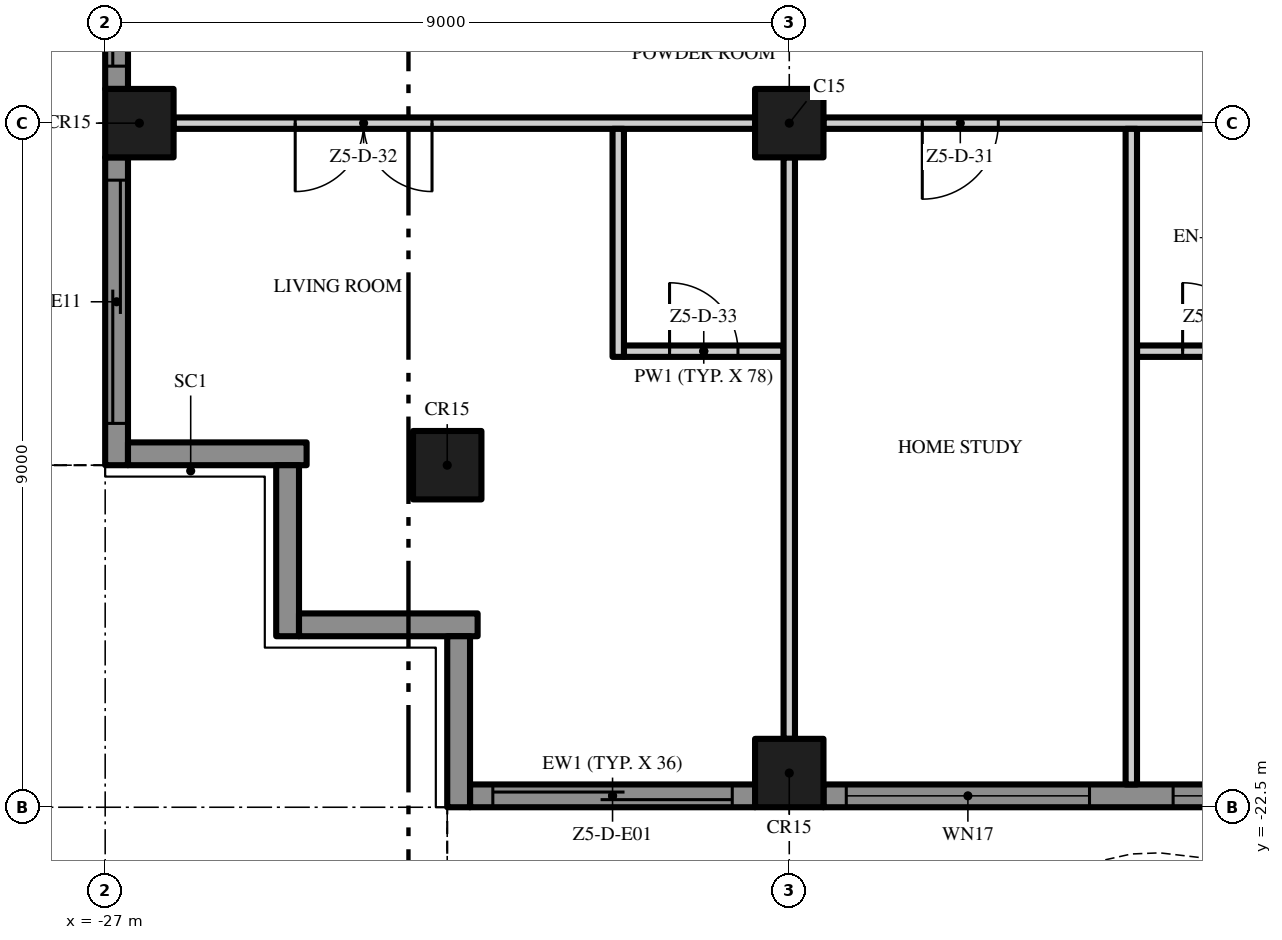
"""IFC4 building model, lengths in metres.
Left out: names, types, materials, properties, quantities, classifications, styles, units other than length and angle.
Written with IfcOpenShell. Run it as: python <this file> out.ifc"""

import sys

from ifc_helpers import new_model, si_unit, direction, frame, frame_2d, origin, origin_2d, place, context, subcontext, project, spatial, polyline, rectangle, outline, extrude, element, fill, save


model = new_model("IFC4")
c1 = context("Model", 3, precision=1e-05, world=origin(), true_north=direction((0.0, 1.0)))
c2 = subcontext(c1, "Body", "Model", "MODEL_VIEW")
j1 = project(units=[si_unit("LENGTHUNIT", "METRE"), si_unit("PLANEANGLEUNIT", "RADIAN")], contexts=[c1])
p1 = place(None, origin())
s1 = spatial("IfcSite", under=j1, at=p1, CompositionType="ELEMENT")
p2 = place(p1, origin())
s2 = spatial("IfcBuilding", under=s1, at=p2, CompositionType="ELEMENT")
p3 = place(p2, frame((0.0, 0.0, 276.8)))
s3 = spatial("IfcBuildingStorey", under=s2, at=p3, CompositionType="ELEMENT", Elevation=276.8)
for number, where, z_axis, x_axis in (
    (1, (-18.0, -13.5, 0.0), (0.0, 0.0, 1.0), (1.0, 0.0, 0.0)),
    (2, (-18.0, -22.05, 0.0), (0.0, 0.0, 1.0), (1.0, 0.0, 0.0)),
    (3, (-26.55, -13.5, 0.0), (0.0, 0.0, 1.0), (1.0, 0.0, 0.0)),
    (4, (-22.5, -18.0, 0.0), (0.0, 0.0, 1.0), (1.0, 0.0, 0.0)),
):
    element("IfcColumn", number, at=place(p3, frame(where, z_axis=z_axis, x_axis=x_axis)), inside=s3, PredefinedType="COLUMN", context=c2, shape_type="SweptSolid", body=[
        extrude(rectangle(XDim=0.9, YDim=0.9, at=origin_2d()), origin(), (0.0, 0.0, 1.0), 3.5),
    ])
p4 = place(p3, frame((-18.45, -22.35, 0.0), z_axis=(0.0, 0.0, 1.0), x_axis=(-1.0, 0.0, 0.0)))
e5 = element("IfcWall", 5, at=p4, inside=s3, PredefinedType="SOLIDWALL", context=c2, shape_type="SweptSolid", body=[
    extrude(rectangle(XDim=3.75, YDim=0.3, at=frame_2d((1.875, 0.0))), origin(), (0.0, 0.0, 1.0), 3.5),
])
p5 = place(p4, frame((0.3, 0.0, 0.0)))
e6 = element("IfcOpeningElement", 6, at=p5, cuts=e5, PredefinedType="OPENING", context=c2, shape_type="SweptSolid", body=[
    extrude(rectangle(XDim=3.15, YDim=2.4, at=frame_2d((1.575, 1.2))), frame((0.0, 0.16, 0.0), z_axis=(0.0, -1.0, 0.0), x_axis=(1.0, 0.0, 0.0)), (0.0, 0.0, 1.0), 0.32),
])
p6 = place(p3, frame((-9.45, -22.35, 0.0), z_axis=(0.0, 0.0, 1.0), x_axis=(-1.0, 0.0, 0.0)))
e7 = element("IfcWall", 7, at=p6, inside=s3, PredefinedType="SOLIDWALL", context=c2, shape_type="SweptSolid", body=[
    extrude(rectangle(XDim=8.1, YDim=0.3, at=frame_2d((4.05, 0.0))), origin(), (0.0, 0.0, 1.0), 3.5),
])
p7 = place(p6, frame((4.6, 0.0, 0.45)))
e8 = element("IfcOpeningElement", 8, at=p7, cuts=e7, PredefinedType="OPENING", context=c2, shape_type="SweptSolid", body=[
    extrude(rectangle(XDim=3.2, YDim=2.65, at=frame_2d((1.6, 1.325))), frame((0.0, 0.16, 0.0), z_axis=(0.0, -1.0, 0.0), x_axis=(1.0, 0.0, 0.0)), (0.0, 0.0, 1.0), 0.32),
])
p8 = place(p6, frame((0.3, 0.0, 0.45)))
e9 = element("IfcOpeningElement", 9, at=p8, cuts=e7, PredefinedType="OPENING", context=c2, shape_type="SweptSolid", body=[
    extrude(rectangle(XDim=3.2, YDim=2.65, at=frame_2d((1.6, 1.325))), frame((0.0, 0.16, 0.0), z_axis=(0.0, -1.0, 0.0), x_axis=(1.0, 0.0, 0.0)), (0.0, 0.0, 1.0), 0.32),
])
p9 = place(p3, frame((-26.85, -13.05, 0.0), z_axis=(0.0, 0.0, 1.0), x_axis=(0.0, 1.0, 0.0)))
e10 = element("IfcWall", 10, at=p9, inside=s3, PredefinedType="SOLIDWALL", context=c2, shape_type="SweptSolid", body=[
    extrude(rectangle(XDim=8.1, YDim=0.3, at=frame_2d((4.05, 0.0))), origin(), (0.0, 0.0, 1.0), 3.5),
])
p10 = place(p9, frame((4.6, 0.0, 0.45)))
e11 = element("IfcOpeningElement", 11, at=p10, cuts=e10, PredefinedType="OPENING", context=c2, shape_type="SweptSolid", body=[
    extrude(rectangle(XDim=3.2, YDim=2.65, at=frame_2d((1.6, 1.325))), frame((0.0, 0.16, 0.0), z_axis=(0.0, -1.0, 0.0), x_axis=(1.0, 0.0, 0.0)), (0.0, 0.0, 1.0), 0.32),
])
p11 = place(p9, frame((0.3, 0.0, 0.0)))
e12 = element("IfcOpeningElement", 12, at=p11, cuts=e10, PredefinedType="OPENING", context=c2, shape_type="SweptSolid", body=[
    extrude(rectangle(XDim=3.2, YDim=2.4, at=frame_2d((1.6, 1.2))), frame((0.0, 0.16, 0.0), z_axis=(0.0, -1.0, 0.0), x_axis=(1.0, 0.0, 0.0)), (0.0, 0.0, 1.0), 0.32),
])
p12 = place(p3, frame((-26.85, -18.0, 0.0), z_axis=(0.0, 0.0, 1.0), x_axis=(0.0, 1.0, 0.0)))
e13 = element("IfcWall", 13, at=p12, inside=s3, PredefinedType="SOLIDWALL", context=c2, shape_type="SweptSolid", body=[
    extrude(rectangle(XDim=4.05, YDim=0.3, at=frame_2d((2.025, 0.0))), origin(), (0.0, 0.0, 1.0), 3.5),
])
p13 = place(p12, frame((0.55, 0.0, 0.0)))
e14 = element("IfcOpeningElement", 14, at=p13, cuts=e13, PredefinedType="OPENING", context=c2, shape_type="SweptSolid", body=[
    extrude(rectangle(XDim=3.2, YDim=2.4, at=frame_2d((1.6, 1.2))), frame((0.0, 0.16, 0.0), z_axis=(0.0, -1.0, 0.0), x_axis=(1.0, 0.0, 0.0)), (0.0, 0.0, 1.0), 0.32),
])
p14 = place(p3, frame((-24.35, -17.85, 0.0), z_axis=(0.0, 0.0, 1.0), x_axis=(-1.0, 0.0, 0.0)))
e15 = element("IfcWall", 15, at=p14, inside=s3, PredefinedType="SOLIDWALL", context=c2, shape_type="SweptSolid", body=[
    extrude(rectangle(XDim=2.35, YDim=0.3, at=frame_2d((1.175, 0.0))), origin(), (0.0, 0.0, 1.0), 3.5),
])
p15 = place(p3, frame((-24.6, -20.25, 0.0), z_axis=(0.0, 0.0, 1.0), x_axis=(0.0, 1.0, 0.0)))
e16 = element("IfcWall", 16, at=p15, inside=s3, PredefinedType="SOLIDWALL", context=c2, shape_type="SweptSolid", body=[
    extrude(rectangle(XDim=2.25, YDim=0.3, at=frame_2d((1.125, 0.0))), origin(), (0.0, 0.0, 1.0), 3.5),
])
p16 = place(p3, frame((-22.1, -20.1, 0.0), z_axis=(0.0, 0.0, 1.0), x_axis=(-1.0, 0.0, 0.0)))
e17 = element("IfcWall", 17, at=p16, inside=s3, PredefinedType="SOLIDWALL", context=c2, shape_type="SweptSolid", body=[
    extrude(rectangle(XDim=2.35, YDim=0.3, at=frame_2d((1.175, 0.0))), origin(), (0.0, 0.0, 1.0), 3.5),
])
p17 = place(p3, frame((-22.35, -22.5, 0.0), z_axis=(0.0, 0.0, 1.0), x_axis=(0.0, 1.0, 0.0)))
e18 = element("IfcWall", 18, at=p17, inside=s3, PredefinedType="SOLIDWALL", context=c2, shape_type="SweptSolid", body=[
    extrude(rectangle(XDim=2.25, YDim=0.3, at=frame_2d((1.125, 0.0))), origin(), (0.0, 0.0, 1.0), 3.5),
])
p18 = place(p3, origin())
e19 = element("IfcWall", 19, at=p18, inside=s3, PredefinedType="USERDEFINED", context=c2, shape_type="SweptSolid", body=[
    extrude(outline(polyline([(-22.5, -25.149), (-21.0, -25.485), (-20.625, -25.5), (-19.5, -25.369), (-18.0, -24.845), (-16.5, -24.112), (-15.0, -23.451), (-13.5, -23.115), (-13.125, -23.1), (-12.0, -23.231), (-10.5, -23.755), (-9.0, -24.488), (-7.5, -25.149), (-6.0, -25.485), (-5.625, -25.5), (-4.5, -25.369), (-3.0, -24.845), (-1.5, -24.112), (0.0, -23.451), (1.5, -23.115), (1.875, -23.1), (3.0, -23.231), (4.5, -23.755), (6.0, -24.488), (7.5, -25.149), (9.0, -25.485), (9.375, -25.5), (10.5, -25.369), (12.0, -24.845), (13.5, -24.112), (15.0, -23.451), (16.5, -23.115), (16.875, -23.1), (18.0, -23.231), (19.5, -23.755), (21.0, -24.488), (22.5, -25.149), (22.601, -24.92), (21.105, -24.261), (19.596, -23.524), (18.056, -22.986), (16.885, -22.849), (16.467, -22.866), (14.921, -23.213), (13.395, -23.885), (11.904, -24.614), (10.444, -25.124), (9.365, -25.249), (9.033, -25.236), (7.579, -24.91), (6.105, -24.261), (4.596, -23.524), (3.056, -22.986), (1.885, -22.849), (1.467, -22.866), (-0.079, -23.213), (-1.605, -23.885), (-3.096, -24.614), (-4.556, -25.124), (-5.635, -25.249), (-5.967, -25.236), (-7.421, -24.91), (-8.895, -24.261), (-10.404, -23.524), (-11.944, -22.986), (-13.115, -22.849), (-13.533, -22.866), (-15.079, -23.213), (-16.605, -23.885), (-18.096, -24.614), (-19.556, -25.124), (-20.635, -25.249), (-20.967, -25.236), (-22.445, -24.905), (-22.5, -25.149)])), origin(), (0.0, 0.0, 1.0), 0.9),
])
p19 = place(p3, origin())
e20 = element("IfcWall", 20, at=p19, inside=s3, PredefinedType="USERDEFINED", context=c2, shape_type="SweptSolid", body=[
    extrude(outline(polyline([(-29.649, 18.0), (-29.985, 16.5), (-30.0, 16.125), (-29.869, 15.0), (-29.345, 13.5), (-28.612, 12.0), (-27.951, 10.5), (-27.615, 9.0), (-27.6, 8.625), (-27.731, 7.5), (-28.255, 6.0), (-28.988, 4.5), (-29.649, 3.0), (-29.985, 1.5), (-30.0, 1.125), (-29.869, 0.0), (-29.345, -1.5), (-28.612, -3.0), (-27.951, -4.5), (-27.615, -6.0), (-27.6, -6.375), (-27.731, -7.5), (-28.255, -9.0), (-28.988, -10.5), (-29.649, -12.0), (-29.985, -13.5), (-30.0, -13.875), (-29.869, -15.0), (-29.345, -16.5), (-28.612, -18.0), (-28.388, -17.89), (-29.114, -16.404), (-29.624, -14.944), (-29.749, -13.865), (-29.736, -13.533), (-29.41, -12.079), (-28.761, -10.605), (-28.024, -9.096), (-27.486, -7.556), (-27.349, -6.385), (-27.366, -5.967), (-27.713, -4.421), (-28.385, -2.895), (-29.114, -1.404), (-29.624, 0.056), (-29.749, 1.135), (-29.736, 1.467), (-29.41, 2.921), (-28.761, 4.395), (-28.024, 5.904), (-27.486, 7.444), (-27.349, 8.615), (-27.366, 9.033), (-27.713, 10.579), (-28.385, 12.105), (-29.114, 13.596), (-29.624, 15.056), (-29.749, 16.135), (-29.736, 16.467), (-29.405, 17.945), (-29.649, 18.0)])), origin(), (0.0, 0.0, 1.0), 0.9),
])
p20 = place(p3, frame((-20.175, -16.5, 0.0), z_axis=(0.0, 0.0, 1.0), x_axis=(1.0, 0.0, 0.0)))
e21 = element("IfcWall", 21, at=p20, inside=s3, PredefinedType="PARTITIONING", context=c2, shape_type="SweptSolid", body=[
    extrude(rectangle(XDim=2.1, YDim=0.15, at=frame_2d((1.05, 0.0))), origin(), (0.0, 0.0, 1.0), 3.5),
])
p21 = place(p20, frame((0.6, 0.0, 0.0)))
e22 = element("IfcOpeningElement", 22, at=p21, cuts=e21, PredefinedType="OPENING", context=c2, shape_type="SweptSolid", body=[
    extrude(rectangle(XDim=0.9, YDim=2.1, at=frame_2d((0.45, 1.05))), frame((0.0, 0.085, 0.0), z_axis=(0.0, -1.0, 0.0), x_axis=(1.0, 0.0, 0.0)), (0.0, 0.0, 1.0), 0.17),
])
p22 = place(p3, frame((-13.425, -16.5, 0.0), z_axis=(0.0, 0.0, 1.0), x_axis=(1.0, 0.0, 0.0)))
e23 = element("IfcWall", 23, at=p22, inside=s3, PredefinedType="PARTITIONING", context=c2, shape_type="SweptSolid", body=[
    extrude(rectangle(XDim=2.1, YDim=0.15, at=frame_2d((1.05, 0.0))), origin(), (0.0, 0.0, 1.0), 3.5),
])
p23 = place(p22, frame((0.6, 0.0, 0.0)))
e24 = element("IfcOpeningElement", 24, at=p23, cuts=e23, PredefinedType="OPENING", context=c2, shape_type="SweptSolid", body=[
    extrude(rectangle(XDim=0.9, YDim=2.1, at=frame_2d((0.45, 1.05))), frame((0.0, 0.085, 0.0), z_axis=(0.0, -1.0, 0.0), x_axis=(1.0, 0.0, 0.0)), (0.0, 0.0, 1.0), 0.17),
])
p24 = place(p3, frame((-18.45, -13.5, 0.0), z_axis=(0.0, 0.0, 1.0), x_axis=(-1.0, 0.0, 0.0)))
e25 = element("IfcWall", 25, at=p24, inside=s3, PredefinedType="PARTITIONING", context=c2, shape_type="SweptSolid", body=[
    extrude(rectangle(XDim=7.65, YDim=0.15, at=frame_2d((3.825, 0.0))), origin(), (0.0, 0.0, 1.0), 3.5),
])
p25 = place(p24, frame((4.25, 0.0, 0.0)))
e26 = element("IfcOpeningElement", 26, at=p25, cuts=e25, PredefinedType="OPENING", context=c2, shape_type="SweptSolid", body=[
    extrude(rectangle(XDim=1.8, YDim=2.4, at=frame_2d((0.9, 1.2))), frame((0.0, 0.085, 0.0), z_axis=(0.0, -1.0, 0.0), x_axis=(1.0, 0.0, 0.0)), (0.0, 0.0, 1.0), 0.17),
])
p26 = place(p3, frame((-9.45, -13.5, 0.0), z_axis=(0.0, 0.0, 1.0), x_axis=(-1.0, 0.0, 0.0)))
e27 = element("IfcWall", 27, at=p26, inside=s3, PredefinedType="PARTITIONING", context=c2, shape_type="SweptSolid", body=[
    extrude(rectangle(XDim=8.1, YDim=0.15, at=frame_2d((4.05, 0.0))), origin(), (0.0, 0.0, 1.0), 3.5),
])
p27 = place(p26, frame((0.2, 0.0, 0.0)))
e28 = element("IfcOpeningElement", 28, at=p27, cuts=e27, PredefinedType="OPENING", context=c2, shape_type="SweptSolid", body=[
    extrude(rectangle(XDim=1.0, YDim=2.4, at=frame_2d((0.5, 1.2))), frame((0.0, 0.085, 0.0), z_axis=(0.0, -1.0, 0.0), x_axis=(1.0, 0.0, 0.0)), (0.0, 0.0, 1.0), 0.17),
])
p28 = place(p26, frame((5.8, 0.0, 0.0)))
e29 = element("IfcOpeningElement", 29, at=p28, cuts=e27, PredefinedType="OPENING", context=c2, shape_type="SweptSolid", body=[
    extrude(rectangle(XDim=1.0, YDim=2.4, at=frame_2d((0.5, 1.2))), frame((0.0, 0.085, 0.0), z_axis=(0.0, -1.0, 0.0), x_axis=(1.0, 0.0, 0.0)), (0.0, 0.0, 1.0), 0.17),
])
p29 = place(p3, frame((-20.25, -16.575, 0.0), z_axis=(0.0, 0.0, 1.0), x_axis=(0.0, 1.0, 0.0)))
e30 = element("IfcWall", 30, at=p29, inside=s3, PredefinedType="PARTITIONING", context=c2, shape_type="SweptSolid", body=[
    extrude(rectangle(XDim=3.0, YDim=0.15, at=frame_2d((1.5, 0.0))), origin(), (0.0, 0.0, 1.0), 3.5),
])
p30 = place(p3, frame((-18.0, -21.6, 0.0), z_axis=(0.0, 0.0, 1.0), x_axis=(0.0, 1.0, 0.0)))
e31 = element("IfcWall", 31, at=p30, inside=s3, PredefinedType="PARTITIONING", context=c2, shape_type="SweptSolid", body=[
    extrude(rectangle(XDim=7.65, YDim=0.15, at=frame_2d((3.825, 0.0))), origin(), (0.0, 0.0, 1.0), 3.5),
])
p31 = place(p3, frame((-13.5, -22.2, 0.0), z_axis=(0.0, 0.0, 1.0), x_axis=(0.0, 1.0, 0.0)))
e32 = element("IfcWall", 32, at=p31, inside=s3, PredefinedType="PARTITIONING", context=c2, shape_type="SweptSolid", body=[
    extrude(rectangle(XDim=8.625, YDim=0.15, at=frame_2d((4.312, 0.0))), origin(), (0.0, 0.0, 1.0), 3.5),
])
p32 = place(p5, origin())
e33 = element("IfcDoor", 33, at=p32, inside=s3, OperationType="SINGLE_SWING_LEFT", PredefinedType="DOOR", context=c2, shape_type="SweptSolid", body=[
    extrude(rectangle(XDim=3.15, YDim=2.4, at=frame_2d((1.575, 1.2))), frame((0.0, 0.025, 0.0), z_axis=(0.0, -1.0, 0.0), x_axis=(1.0, 0.0, 0.0)), (0.0, 0.0, 1.0), 0.05),
])
fill(e6, e33)
p33 = place(p7, origin())
e34 = element("IfcWindow", 34, at=p33, inside=s3, PartitioningType="SINGLE_PANEL", PredefinedType="WINDOW", context=c2, shape_type="SweptSolid", body=[
    extrude(rectangle(XDim=3.2, YDim=2.65, at=frame_2d((1.6, 1.325))), frame((0.0, 0.03, 0.0), z_axis=(0.0, -1.0, 0.0), x_axis=(1.0, 0.0, 0.0)), (0.0, 0.0, 1.0), 0.06),
])
fill(e8, e34)
p34 = place(p8, origin())
e35 = element("IfcWindow", 35, at=p34, inside=s3, PartitioningType="SINGLE_PANEL", PredefinedType="WINDOW", context=c2, shape_type="SweptSolid", body=[
    extrude(rectangle(XDim=3.2, YDim=2.65, at=frame_2d((1.6, 1.325))), frame((0.0, 0.03, 0.0), z_axis=(0.0, -1.0, 0.0), x_axis=(1.0, 0.0, 0.0)), (0.0, 0.0, 1.0), 0.06),
])
fill(e9, e35)
p35 = place(p11, origin())
e36 = element("IfcDoor", 36, at=p35, inside=s3, OperationType="SINGLE_SWING_LEFT", PredefinedType="DOOR", context=c2, shape_type="SweptSolid", body=[
    extrude(rectangle(XDim=3.2, YDim=2.4, at=frame_2d((1.6, 1.2))), frame((0.0, 0.025, 0.0), z_axis=(0.0, -1.0, 0.0), x_axis=(1.0, 0.0, 0.0)), (0.0, 0.0, 1.0), 0.05),
])
fill(e12, e36)
p36 = place(p13, origin())
e37 = element("IfcDoor", 37, at=p36, inside=s3, OperationType="SINGLE_SWING_LEFT", PredefinedType="DOOR", context=c2, shape_type="SweptSolid", body=[
    extrude(rectangle(XDim=3.2, YDim=2.4, at=frame_2d((1.6, 1.2))), frame((0.0, 0.025, 0.0), z_axis=(0.0, -1.0, 0.0), x_axis=(1.0, 0.0, 0.0)), (0.0, 0.0, 1.0), 0.05),
])
fill(e14, e37)
p37 = place(p23, origin())
e38 = element("IfcDoor", 38, at=p37, inside=s3, OperationType="SINGLE_SWING_LEFT", PredefinedType="DOOR", context=c2, shape_type="SweptSolid", body=[
    extrude(rectangle(XDim=0.9, YDim=2.1, at=frame_2d((0.45, 1.05))), frame((0.0, 0.025, 0.0), z_axis=(0.0, -1.0, 0.0), x_axis=(1.0, 0.0, 0.0)), (0.0, 0.0, 1.0), 0.05),
])
fill(e24, e38)
p38 = place(p28, origin())
e39 = element("IfcDoor", 39, at=p38, inside=s3, OperationType="SINGLE_SWING_RIGHT", PredefinedType="DOOR", context=c2, shape_type="SweptSolid", body=[
    extrude(rectangle(XDim=1.0, YDim=2.4, at=frame_2d((0.5, 1.2))), frame((0.0, 0.025, 0.0), z_axis=(0.0, -1.0, 0.0), x_axis=(1.0, 0.0, 0.0)), (0.0, 0.0, 1.0), 0.05),
])
fill(e29, e39)
p39 = place(p25, origin())
e40 = element("IfcDoor", 40, at=p39, inside=s3, OperationType="DOUBLE_DOOR_SINGLE_SWING", PredefinedType="DOOR", context=c2, shape_type="SweptSolid", body=[
    extrude(rectangle(XDim=1.8, YDim=2.4, at=frame_2d((0.9, 1.2))), frame((0.0, 0.025, 0.0), z_axis=(0.0, -1.0, 0.0), x_axis=(1.0, 0.0, 0.0)), (0.0, 0.0, 1.0), 0.05),
])
fill(e26, e40)
p40 = place(p21, origin())
e41 = element("IfcDoor", 41, at=p40, inside=s3, OperationType="SINGLE_SWING_LEFT", PredefinedType="DOOR", context=c2, shape_type="SweptSolid", body=[
    extrude(rectangle(XDim=0.9, YDim=2.1, at=frame_2d((0.45, 1.05))), frame((0.0, 0.025, 0.0), z_axis=(0.0, -1.0, 0.0), x_axis=(1.0, 0.0, 0.0)), (0.0, 0.0, 1.0), 0.05),
])
fill(e22, e41)
save(model, sys.argv[1])
